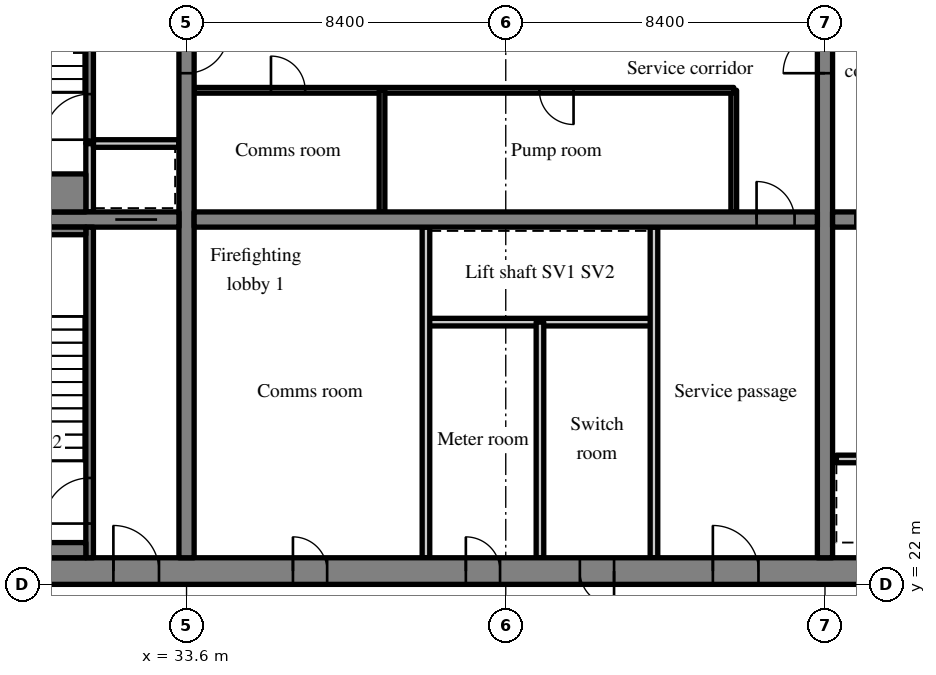
"""IFC4 building model, lengths in metres.
Left out: names, types, materials, properties, quantities, classifications, styles, units other than length and angle.
Written with IfcOpenShell. Run it as: python <this file> out.ifc"""

import sys

from ifc_helpers import new_model, si_unit, direction, frame, frame_2d, origin, place, context, subcontext, project, spatial, rectangle, extrude, source, transform, mapped, element, fill, save


model = new_model("IFC4")
c1 = context("Model", 3, precision=1e-05, world=origin(), true_north=direction((0.0, 1.0)))
c2 = subcontext(c1, "Body", "Model", "MODEL_VIEW")
j1 = project(units=[si_unit("LENGTHUNIT", "METRE"), si_unit("PLANEANGLEUNIT", "RADIAN")], contexts=[c1])
p1 = place(None, origin())
s1 = spatial("IfcSite", under=j1, at=p1, CompositionType="ELEMENT")
p2 = place(p1, origin())
s2 = spatial("IfcBuilding", under=s1, at=p2, CompositionType="ELEMENT")
p3 = place(p2, frame((0.0, 0.0, 201.0)))
s3 = spatial("IfcBuildingStorey", under=s2, at=p3, CompositionType="ELEMENT", Elevation=201.0)
m1 = source(origin(), c2, "Body", "SweptSolid", [
    extrude(rectangle(XDim=50.4, YDim=0.7, at=frame_2d((25.2, 0.0))), origin(), (0.0, 0.0, 1.0), 5.12),
])
p4 = place(p3, frame((25.2, 22.35, 0.0), z_axis=(0.0, 0.0, 1.0), x_axis=(1.0, 0.0, 0.0)))
e1 = element("IfcWall", 1, at=p4, inside=s3, PredefinedType="SHEAR", context=c2, shape_type="MappedRepresentation", body=[
    mapped(m1, transform((0.0, 0.0, 0.0), scale=1.0)),
])
m2 = source(origin(), c2, "Body", "SweptSolid", [
    extrude(rectangle(XDim=1.2, YDim=2.1, at=frame_2d((0.6, 1.05))), frame((0.0, 0.36, 0.0), z_axis=(0.0, -1.0, 0.0), x_axis=(1.0, 0.0, 0.0)), (0.0, 0.0, 1.0), 0.72),
])
p5 = place(p4, frame((22.25, 0.0, 0.0)))
e2 = element("IfcOpeningElement", 2, at=p5, cuts=e1, PredefinedType="OPENING", context=c2, shape_type="MappedRepresentation", body=[
    mapped(m2, transform((0.0, 0.0, 0.0), scale=1.0)),
])
m3 = source(origin(), c2, "Body", "SweptSolid", [
    extrude(rectangle(XDim=0.9, YDim=2.1, at=frame_2d((0.45, 1.05))), frame((0.0, 0.36, 0.0), z_axis=(0.0, -1.0, 0.0), x_axis=(1.0, 0.0, 0.0)), (0.0, 0.0, 1.0), 0.72),
])
p6 = place(p4, frame((15.75, 0.0, 0.0)))
e3 = element("IfcOpeningElement", 3, at=p6, cuts=e1, PredefinedType="OPENING", context=c2, shape_type="MappedRepresentation", body=[
    mapped(m3, transform((0.0, 0.0, 0.0), scale=1.0)),
])
p7 = place(p4, frame((18.75, 0.0, 0.0)))
e4 = element("IfcOpeningElement", 4, at=p7, cuts=e1, PredefinedType="OPENING", context=c2, shape_type="MappedRepresentation", body=[
    mapped(m3, transform((0.0, 0.0, 0.0), scale=1.0)),
])
p8 = place(p4, frame((11.2, 0.0, 0.0)))
e5 = element("IfcOpeningElement", 5, at=p8, cuts=e1, PredefinedType="OPENING", context=c2, shape_type="MappedRepresentation", body=[
    mapped(m3, transform((0.0, 0.0, 0.0), scale=1.0)),
])
m4 = source(origin(), c2, "Body", "SweptSolid", [
    extrude(rectangle(XDim=1.8, YDim=2.1, at=frame_2d((0.9, 1.05))), frame((0.0, 0.36, 0.0), z_axis=(0.0, -1.0, 0.0), x_axis=(1.0, 0.0, 0.0)), (0.0, 0.0, 1.0), 0.72),
])
p9 = place(p4, frame((32.7, 0.0, 0.0)))
e6 = element("IfcOpeningElement", 6, at=p9, cuts=e1, PredefinedType="OPENING", context=c2, shape_type="MappedRepresentation", body=[
    mapped(m4, transform((0.0, 0.0, 0.0), scale=1.0)),
])
p10 = place(p4, frame((6.475, 0.0, 0.0)))
e7 = element("IfcOpeningElement", 7, at=p10, cuts=e1, PredefinedType="OPENING", context=c2, shape_type="MappedRepresentation", body=[
    mapped(m2, transform((0.0, 0.0, 0.0), scale=1.0)),
])
p11 = place(p4, frame((47.875, 0.0, 0.0)))
e8 = element("IfcOpeningElement", 8, at=p11, cuts=e1, PredefinedType="OPENING", context=c2, shape_type="MappedRepresentation", body=[
    mapped(m2, transform((0.0, 0.0, 0.0), scale=1.0)),
])
m5 = source(origin(), c2, "Body", "SweptSolid", [
    extrude(rectangle(XDim=18.6, YDim=0.4, at=frame_2d((9.3, 0.0))), origin(), (0.0, 0.0, 1.0), 5.12),
])
p12 = place(p3, frame((33.6, 22.7, 0.0), z_axis=(0.0, 0.0, 1.0), x_axis=(0.0, 1.0, 0.0)))
e9 = element("IfcWall", 9, at=p12, inside=s3, PredefinedType="SHEAR", context=c2, shape_type="MappedRepresentation", body=[
    mapped(m5, transform((0.0, 0.0, 0.0), scale=1.0)),
])
m6 = source(origin(), c2, "Body", "SweptSolid", [
    extrude(rectangle(XDim=1.1, YDim=2.1, at=frame_2d((0.55, 1.05))), frame((0.0, 0.21, 0.0), z_axis=(0.0, -1.0, 0.0), x_axis=(1.0, 0.0, 0.0)), (0.0, 0.0, 1.0), 0.42),
])
p13 = place(p12, frame((12.75, 0.0, 0.0)))
e10 = element("IfcOpeningElement", 10, at=p13, cuts=e9, PredefinedType="OPENING", context=c2, shape_type="MappedRepresentation", body=[
    mapped(m6, transform((0.0, 0.0, 0.0), scale=1.0)),
])
p14 = place(p3, frame((50.4, 22.7, 0.0), z_axis=(0.0, 0.0, 1.0), x_axis=(0.0, 1.0, 0.0)))
e11 = element("IfcWall", 11, at=p14, inside=s3, PredefinedType="SHEAR", context=c2, shape_type="MappedRepresentation", body=[
    mapped(m5, transform((0.0, 0.0, 0.0), scale=1.0)),
])
p15 = place(p14, frame((12.75, 0.0, 0.0)))
e12 = element("IfcOpeningElement", 12, at=p15, cuts=e11, PredefinedType="OPENING", context=c2, shape_type="MappedRepresentation", body=[
    mapped(m6, transform((0.0, 0.0, 0.0), scale=1.0)),
])
m7 = source(origin(), c2, "Body", "SweptSolid", [
    extrude(rectangle(XDim=7.5, YDim=0.4, at=frame_2d((3.75, 0.0))), origin(), (0.0, 0.0, 1.0), 5.12),
])
p16 = place(p3, frame((25.9, 31.6, 0.0), z_axis=(0.0, 0.0, 1.0), x_axis=(1.0, 0.0, 0.0)))
e13 = element("IfcWall", 13, at=p16, inside=s3, PredefinedType="SHEAR", context=c2, shape_type="MappedRepresentation", body=[
    mapped(m7, transform((0.0, 0.0, 0.0), scale=1.0)),
])
p17 = place(p16, frame((5.825, 0.0, 0.0)))
e14 = element("IfcOpeningElement", 14, at=p17, cuts=e13, PredefinedType="OPENING", context=c2, shape_type="MappedRepresentation", body=[
    mapped(m6, transform((0.0, 0.0, 0.0), scale=1.0)),
])
m8 = source(origin(), c2, "Body", "SweptSolid", [
    extrude(rectangle(XDim=16.4, YDim=0.4, at=frame_2d((8.2, 0.0))), origin(), (0.0, 0.0, 1.0), 5.12),
])
p18 = place(p3, frame((33.8, 31.6, 0.0), z_axis=(0.0, 0.0, 1.0), x_axis=(1.0, 0.0, 0.0)))
e15 = element("IfcWall", 15, at=p18, inside=s3, PredefinedType="SHEAR", context=c2, shape_type="MappedRepresentation", body=[
    mapped(m8, transform((0.0, 0.0, 0.0), scale=1.0)),
])
m9 = source(origin(), c2, "Body", "SweptSolid", [
    extrude(rectangle(XDim=1.0, YDim=2.1, at=frame_2d((0.5, 1.05))), frame((0.0, 0.21, 0.0), z_axis=(0.0, -1.0, 0.0), x_axis=(1.0, 0.0, 0.0)), (0.0, 0.0, 1.0), 0.42),
])
p19 = place(p18, frame((14.8, 0.0, 0.0)))
e16 = element("IfcOpeningElement", 16, at=p19, cuts=e15, PredefinedType="OPENING", context=c2, shape_type="MappedRepresentation", body=[
    mapped(m9, transform((0.0, 0.0, 0.0), scale=1.0)),
])
p20 = place(p3, frame((50.6, 31.6, 0.0), z_axis=(0.0, 0.0, 1.0), x_axis=(1.0, 0.0, 0.0)))
e17 = element("IfcWall", 17, at=p20, inside=s3, PredefinedType="SHEAR", context=c2, shape_type="MappedRepresentation", body=[
    mapped(m8, transform((0.0, 0.0, 0.0), scale=1.0)),
])
p21 = place(p20, frame((0.6, 0.0, 0.0)))
e18 = element("IfcOpeningElement", 18, at=p21, cuts=e17, PredefinedType="OPENING", context=c2, shape_type="MappedRepresentation", body=[
    mapped(m9, transform((0.0, 0.0, 0.0), scale=1.0)),
])
m10 = source(origin(), c2, "Body", "SweptSolid", [
    extrude(rectangle(XDim=6.0, YDim=0.2, at=frame_2d((3.0, 0.0))), origin(), (0.0, 0.0, 1.0), 5.12),
])
p22 = place(p3, frame((39.9, 28.9, 0.0), z_axis=(0.0, 0.0, 1.0), x_axis=(1.0, 0.0, 0.0)))
e19 = element("IfcWall", 19, at=p22, inside=s3, PredefinedType="SOLIDWALL", context=c2, shape_type="MappedRepresentation", body=[
    mapped(m10, transform((0.0, 0.0, 0.0), scale=1.0)),
])
m11 = source(origin(), c2, "Body", "SweptSolid", [
    extrude(rectangle(XDim=8.7, YDim=0.2, at=frame_2d((4.35, 0.0))), origin(), (0.0, 0.0, 1.0), 5.12),
])
for number, where, z_axis, x_axis in (
    (20, (45.9, 22.7, 0.0), (0.0, 0.0, 1.0), (0.0, 1.0, 0.0)),
    (21, (39.9, 22.7, 0.0), (0.0, 0.0, 1.0), (0.0, 1.0, 0.0)),
):
    element("IfcWall", number, at=place(p3, frame(where, z_axis=z_axis, x_axis=x_axis)), inside=s3, PredefinedType="PARTITIONING", context=c2, shape_type="MappedRepresentation", body=[
        mapped(m11, transform((0.0, 0.0, 0.0), scale=1.0)),
    ])
m12 = source(origin(), c2, "Body", "SweptSolid", [
    extrude(rectangle(XDim=6.2, YDim=0.2, at=frame_2d((3.1, 0.0))), origin(), (0.0, 0.0, 1.0), 5.12),
])
p23 = place(p3, frame((42.9, 22.7, 0.0), z_axis=(0.0, 0.0, 1.0), x_axis=(0.0, 1.0, 0.0)))
e22 = element("IfcWall", 22, at=p23, inside=s3, PredefinedType="PARTITIONING", context=c2, shape_type="MappedRepresentation", body=[
    mapped(m12, transform((0.0, 0.0, 0.0), scale=1.0)),
])
m13 = source(origin(), c2, "Body", "SweptSolid", [
    extrude(rectangle(XDim=3.2, YDim=0.15, at=frame_2d((1.6, 0.0))), origin(), (0.0, 0.0, 1.0), 5.12),
])
p24 = place(p3, frame((48.0, 31.8, 0.0), z_axis=(0.0, 0.0, 1.0), x_axis=(0.0, 1.0, 0.0)))
e23 = element("IfcWall", 23, at=p24, inside=s3, PredefinedType="PARTITIONING", context=c2, shape_type="MappedRepresentation", body=[
    mapped(m13, transform((0.0, 0.0, 0.0), scale=1.0)),
])
m14 = source(origin(), c2, "Body", "SweptSolid", [
    extrude(rectangle(XDim=14.2, YDim=0.15, at=frame_2d((7.1, 0.0))), origin(), (0.0, 0.0, 1.0), 5.12),
])
p25 = place(p3, frame((33.8, 35.0, 0.0), z_axis=(0.0, 0.0, 1.0), x_axis=(1.0, 0.0, 0.0)))
e24 = element("IfcWall", 24, at=p25, inside=s3, PredefinedType="PARTITIONING", context=c2, shape_type="MappedRepresentation", body=[
    mapped(m14, transform((0.0, 0.0, 0.0), scale=1.0)),
])
m15 = source(origin(), c2, "Body", "SweptSolid", [
    extrude(rectangle(XDim=0.9, YDim=2.1, at=frame_2d((0.45, 1.05))), frame((0.0, 0.085, 0.0), z_axis=(0.0, -1.0, 0.0), x_axis=(1.0, 0.0, 0.0)), (0.0, 0.0, 1.0), 0.17),
])
p26 = place(p25, frame((2.022, 0.0, 0.0)))
e25 = element("IfcOpeningElement", 25, at=p26, cuts=e24, PredefinedType="OPENING", context=c2, shape_type="MappedRepresentation", body=[
    mapped(m15, transform((0.0, 0.0, 0.0), scale=1.0)),
])
p27 = place(p25, frame((9.084, 0.0, 0.0)))
e26 = element("IfcOpeningElement", 26, at=p27, cuts=e24, PredefinedType="OPENING", context=c2, shape_type="MappedRepresentation", body=[
    mapped(m15, transform((0.0, 0.0, 0.0), scale=1.0)),
])
p28 = place(p3, frame((38.744, 31.8, 0.0), z_axis=(0.0, 0.0, 1.0), x_axis=(0.0, 1.0, 0.0)))
e27 = element("IfcWall", 27, at=p28, inside=s3, PredefinedType="PARTITIONING", context=c2, shape_type="MappedRepresentation", body=[
    mapped(m13, transform((0.0, 0.0, 0.0), scale=1.0)),
])
p29 = place(p3, frame((56.7, 25.3, 0.0), z_axis=(0.0, 0.0, 1.0), x_axis=(-1.0, 0.0, 0.0)))
e28 = element("IfcWall", 28, at=p29, inside=s3, PredefinedType="SOLIDWALL", context=c2, shape_type="MappedRepresentation", body=[
    mapped(m10, transform((0.0, 0.0, 0.0), scale=1.0)),
])
m16 = source(origin(), c2, "Body", "SweptSolid", [
    extrude(rectangle(XDim=8.7, YDim=0.2, at=frame_2d((4.35, 0.0))), origin(), (0.0, 0.0, 1.0), 5.12),
])
p30 = place(p3, frame((31.05, 22.7, 0.0), z_axis=(0.0, 0.0, 1.0), x_axis=(0.0, 1.0, 0.0)))
e29 = element("IfcWall", 29, at=p30, inside=s3, PredefinedType="SOLIDWALL", context=c2, shape_type="MappedRepresentation", body=[
    mapped(m16, transform((0.0, 0.0, 0.0), scale=1.0)),
])
m17 = source(origin(), c2, "Body", "SweptSolid", [
    extrude(rectangle(XDim=1.2, YDim=2.1, at=frame_2d((0.6, 1.05))), frame((0.0, 0.11, 0.0), z_axis=(0.0, -1.0, 0.0), x_axis=(1.0, 0.0, 0.0)), (0.0, 0.0, 1.0), 0.22),
])
p31 = place(p30, frame((0.9, 0.0, 0.0)))
e30 = element("IfcOpeningElement", 30, at=p31, cuts=e29, PredefinedType="OPENING", context=c2, shape_type="MappedRepresentation", body=[
    mapped(m17, transform((0.0, 0.0, 0.0), scale=1.0)),
])
m18 = source(origin(), c2, "Body", "SweptSolid", [
    extrude(rectangle(XDim=1.8, YDim=0.2, at=frame_2d((0.9, 0.0))), origin(), (0.0, 0.0, 1.0), 5.12),
])
p32 = place(p3, frame((31.05, 31.8, 0.0), z_axis=(0.0, 0.0, 1.0), x_axis=(0.0, 1.0, 0.0)))
e31 = element("IfcWall", 31, at=p32, inside=s3, PredefinedType="SOLIDWALL", context=c2, shape_type="MappedRepresentation", body=[
    mapped(m18, transform((0.0, 0.0, 0.0), scale=1.0)),
])
m19 = source(origin(), c2, "Body", "SweptSolid", [
    extrude(rectangle(XDim=2.25, YDim=0.2, at=frame_2d((1.125, 0.0))), origin(), (0.0, 0.0, 1.0), 5.12),
])
p33 = place(p3, frame((31.15, 33.6, 0.0), z_axis=(0.0, 0.0, 1.0), x_axis=(1.0, 0.0, 0.0)))
e32 = element("IfcWall", 32, at=p33, inside=s3, PredefinedType="SOLIDWALL", context=c2, shape_type="MappedRepresentation", body=[
    mapped(m19, transform((0.0, 0.0, 0.0), scale=1.0)),
])
m20 = source(origin(), c2, "Body", "SweptSolid", [
    extrude(rectangle(XDim=7.7, YDim=0.2, at=frame_2d((3.85, 0.0))), origin(), (0.0, 0.0, 1.0), 5.12),
])
p34 = place(p3, frame((31.05, 33.6, 0.0), z_axis=(0.0, 0.0, 1.0), x_axis=(0.0, 1.0, 0.0)))
e33 = element("IfcWall", 33, at=p34, inside=s3, PredefinedType="SOLIDWALL", context=c2, shape_type="MappedRepresentation", body=[
    mapped(m20, transform((0.0, 0.0, 0.0), scale=1.0)),
])
p35 = place(p34, frame((0.1, 0.0, 0.0)))
e34 = element("IfcOpeningElement", 34, at=p35, cuts=e33, PredefinedType="OPENING", context=c2, shape_type="MappedRepresentation", body=[
    mapped(m17, transform((0.0, 0.0, 0.0), scale=1.0)),
])
m21 = source(origin(), c2, "Body", "SweptSolid", [
    extrude(rectangle(XDim=5.05, YDim=0.4, at=frame_2d((2.525, 0.0))), origin(), (0.0, 0.0, 1.0), 5.12),
])
p36 = place(p3, frame((25.9, 22.9, 0.0), z_axis=(0.0, 0.0, 1.0), x_axis=(1.0, 0.0, 0.0)))
e35 = element("IfcWall", 35, at=p36, inside=s3, PredefinedType="SOLIDWALL", context=c2, shape_type="MappedRepresentation", body=[
    mapped(m21, transform((0.0, 0.0, 0.0), scale=1.0)),
])
m22 = source(origin(), c2, "Body", "SweptSolid", [
    extrude(rectangle(XDim=5.05, YDim=0.2, at=frame_2d((2.525, 0.0))), origin(), (0.0, 0.0, 1.0), 5.12),
])
p37 = place(p3, frame((25.9, 31.3, 0.0), z_axis=(0.0, 0.0, 1.0), x_axis=(1.0, 0.0, 0.0)))
e36 = element("IfcWall", 36, at=p37, inside=s3, PredefinedType="SOLIDWALL", context=c2, shape_type="MappedRepresentation", body=[
    mapped(m22, transform((0.0, 0.0, 0.0), scale=1.0)),
])
m23 = source(origin(), c2, "Body", "SweptSolid", [
    extrude(rectangle(XDim=5.05, YDim=1.0, at=frame_2d((2.525, 0.0))), origin(), (0.0, 0.0, 1.0), 5.12),
])
p38 = place(p3, frame((25.9, 32.3, 0.0), z_axis=(0.0, 0.0, 1.0), x_axis=(1.0, 0.0, 0.0)))
e37 = element("IfcWall", 37, at=p38, inside=s3, PredefinedType="SOLIDWALL", context=c2, shape_type="MappedRepresentation", body=[
    mapped(m23, transform((0.0, 0.0, 0.0), scale=1.0)),
])
m24 = source(origin(), c2, "Body", "SweptSolid", [
    extrude(rectangle(XDim=1.2, YDim=2.1, at=frame_2d((0.6, 1.05))), frame((0.0, 0.275, 0.0), z_axis=(0.0, -1.0, 0.0), x_axis=(1.0, 0.0, 0.0)), (0.0, 0.0, 1.0), 0.05),
])
p39 = place(p5, origin())
e38 = element("IfcDoor", 38, at=p39, inside=s3, OperationType="SINGLE_SWING_LEFT", PredefinedType="DOOR", context=c2, shape_type="MappedRepresentation", body=[
    mapped(m24, transform((0.0, 0.0, 0.0), scale=1.0)),
])
fill(e2, e38)
m25 = source(origin(), c2, "Body", "SweptSolid", [
    extrude(rectangle(XDim=1.0, YDim=2.1, at=frame_2d((0.5, 1.05))), frame((0.0, 0.025, 0.0), z_axis=(0.0, -1.0, 0.0), x_axis=(1.0, 0.0, 0.0)), (0.0, 0.0, 1.0), 0.05),
])
p40 = place(p19, origin())
e39 = element("IfcDoor", 39, at=p40, inside=s3, OperationType="SINGLE_SWING_LEFT", PredefinedType="DOOR", context=c2, shape_type="MappedRepresentation", body=[
    mapped(m25, transform((0.0, 0.0, 0.0), scale=1.0)),
])
fill(e16, e39)
m26 = source(origin(), c2, "Body", "SweptSolid", [
    extrude(rectangle(XDim=0.9, YDim=2.1, at=frame_2d((0.45, 1.05))), frame((0.0, 0.275, 0.0), z_axis=(0.0, -1.0, 0.0), x_axis=(1.0, 0.0, 0.0)), (0.0, 0.0, 1.0), 0.05),
])
p41 = place(p6, origin())
e40 = element("IfcDoor", 40, at=p41, inside=s3, OperationType="SINGLE_SWING_LEFT", PredefinedType="DOOR", context=c2, shape_type="MappedRepresentation", body=[
    mapped(m26, transform((0.0, 0.0, 0.0), scale=1.0)),
])
fill(e3, e40)
p42 = place(p7, origin())
e41 = element("IfcDoor", 41, at=p42, inside=s3, OperationType="SINGLE_SWING_RIGHT", PredefinedType="DOOR", context=c2, shape_type="MappedRepresentation", body=[
    mapped(m26, transform((0.0, 0.0, 0.0), scale=1.0)),
])
fill(e4, e41)
p43 = place(p8, origin())
e42 = element("IfcDoor", 42, at=p43, inside=s3, OperationType="SINGLE_SWING_LEFT", PredefinedType="DOOR", context=c2, shape_type="MappedRepresentation", body=[
    mapped(m26, transform((0.0, 0.0, 0.0), scale=1.0)),
])
fill(e5, e42)
m27 = source(origin(), c2, "Body", "SweptSolid", [
    extrude(rectangle(XDim=0.9, YDim=2.1, at=frame_2d((0.45, 1.05))), frame((0.0, 0.025, 0.0), z_axis=(0.0, -1.0, 0.0), x_axis=(1.0, 0.0, 0.0)), (0.0, 0.0, 1.0), 0.05),
])
p44 = place(p26, origin())
e43 = element("IfcDoor", 43, at=p44, inside=s3, OperationType="SINGLE_SWING_LEFT", PredefinedType="DOOR", context=c2, shape_type="MappedRepresentation", body=[
    mapped(m27, transform((0.0, 0.0, 0.0), scale=1.0)),
])
fill(e25, e43)
p45 = place(p27, origin())
e44 = element("IfcDoor", 44, at=p45, inside=s3, OperationType="SINGLE_SWING_RIGHT", PredefinedType="DOOR", context=c2, shape_type="MappedRepresentation", body=[
    mapped(m27, transform((0.0, 0.0, 0.0), scale=1.0)),
])
fill(e26, e44)
m28 = source(origin(), c2, "Body", "SweptSolid", [
    extrude(rectangle(XDim=1.2, YDim=2.1, at=frame_2d((0.6, 1.05))), frame((0.0, 0.025, 0.0), z_axis=(0.0, -1.0, 0.0), x_axis=(1.0, 0.0, 0.0)), (0.0, 0.0, 1.0), 0.05),
])
p46 = place(p31, origin())
e45 = element("IfcDoor", 45, at=p46, inside=s3, OperationType="SINGLE_SWING_LEFT", PredefinedType="DOOR", context=c2, shape_type="MappedRepresentation", body=[
    mapped(m28, transform((0.0, 0.0, 0.0), scale=1.0)),
])
fill(e30, e45)
p47 = place(p10, origin())
e46 = element("IfcDoor", 46, at=p47, inside=s3, OperationType="SINGLE_SWING_LEFT", PredefinedType="DOOR", context=c2, shape_type="MappedRepresentation", body=[
    mapped(m24, transform((0.0, 0.0, 0.0), scale=1.0)),
])
fill(e7, e46)
m29 = source(origin(), c2, "Body", "SweptSolid", [
    extrude(rectangle(XDim=1.1, YDim=2.1, at=frame_2d((0.55, 1.05))), frame((0.0, 0.025, 0.0), z_axis=(0.0, -1.0, 0.0), x_axis=(1.0, 0.0, 0.0)), (0.0, 0.0, 1.0), 0.05),
])
p48 = place(p17, origin())
e47 = element("IfcDoor", 47, at=p48, inside=s3, OperationType="SLIDING_TO_LEFT", PredefinedType="DOOR", context=c2, shape_type="MappedRepresentation", body=[
    mapped(m29, transform((0.0, 0.0, 0.0), scale=1.0)),
])
fill(e14, e47)
p49 = place(p35, origin())
e48 = element("IfcDoor", 48, at=p49, inside=s3, OperationType="SINGLE_SWING_LEFT", PredefinedType="DOOR", context=c2, shape_type="MappedRepresentation", body=[
    mapped(m28, transform((0.0, 0.0, 0.0), scale=1.0)),
])
fill(e34, e48)
p50 = place(p13, origin())
e49 = element("IfcDoor", 49, at=p50, inside=s3, OperationType="SINGLE_SWING_RIGHT", PredefinedType="DOOR", context=c2, shape_type="MappedRepresentation", body=[
    mapped(m29, transform((0.0, 0.0, 0.0), scale=1.0)),
])
fill(e10, e49)
p51 = place(p15, origin())
e50 = element("IfcDoor", 50, at=p51, inside=s3, OperationType="SINGLE_SWING_LEFT", PredefinedType="DOOR", context=c2, shape_type="MappedRepresentation", body=[
    mapped(m29, transform((0.0, 0.0, 0.0), scale=1.0)),
])
fill(e12, e50)
save(model, sys.argv[1])
